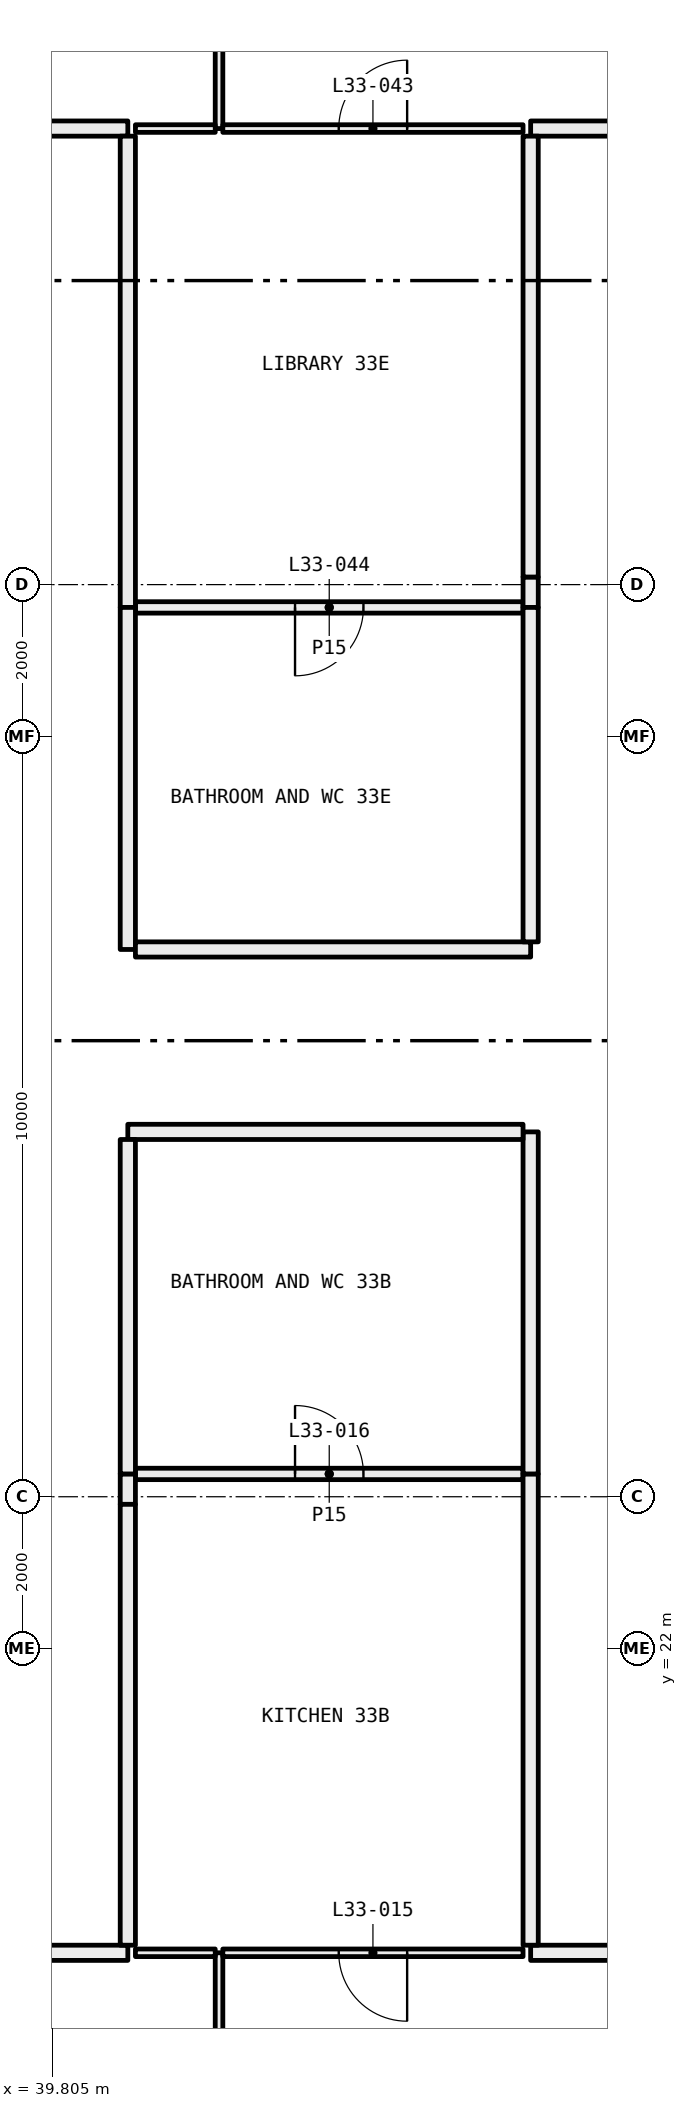
"""IFC4 building model, lengths in metres.
Left out: names, types, materials, properties, quantities, classifications, styles, units other than length and angle.
Written with IfcOpenShell. Run it as: python <this file> out.ifc"""

import sys

from ifc_helpers import new_model, si_unit, direction, frame, frame_2d, origin, place, context, subcontext, project, spatial, rectangle, extrude, element, fill, save


model = new_model("IFC4")
c1 = context("Model", 3, precision=1e-05, world=origin(), true_north=direction((0.0, 1.0)))
c2 = subcontext(c1, "Body", "Model", "MODEL_VIEW")
j1 = project(units=[si_unit("LENGTHUNIT", "METRE"), si_unit("PLANEANGLEUNIT", "RADIAN")], contexts=[c1])
p1 = place(None, origin())
s1 = spatial("IfcSite", under=j1, at=p1, CompositionType="ELEMENT")
p2 = place(p1, origin())
s2 = spatial("IfcBuilding", under=s1, at=p2, CompositionType="ELEMENT")
p3 = place(p2, frame((0.0, 0.0, 127.65)))
s3 = spatial("IfcBuildingStorey", under=s2, at=p3, CompositionType="ELEMENT", Elevation=127.65)
p4 = place(p3, frame((42.0, 12.72, 0.0), z_axis=(0.0, 0.0, 1.0), x_axis=(0.0, 1.0, 0.0)))
e1 = element("IfcWall", 1, at=p4, inside=s3, PredefinedType="PARTITIONING", context=c2, shape_type="SweptSolid", body=[
    extrude(rectangle(XDim=5.28, YDim=0.1, at=frame_2d((2.64, 0.0))), origin(), (0.0, 0.0, 1.0), 3.05),
])
p5 = place(p4, frame((2.19, 0.0, 0.0)))
e2 = element("IfcOpeningElement", 2, at=p5, cuts=e1, PredefinedType="OPENING", context=c2, shape_type="SweptSolid", body=[
    extrude(rectangle(XDim=0.9, YDim=2.1, at=frame_2d((0.45, 1.05))), frame((0.0, 0.06, 0.0), z_axis=(0.0, -1.0, 0.0), x_axis=(1.0, 0.0, 0.0)), (0.0, 0.0, 1.0), 0.12),
])
p6 = place(p3, frame((41.95, 18.0, 0.0), z_axis=(0.0, 0.0, 1.0), x_axis=(-1.0, 0.0, 0.0)))
e3 = element("IfcWall", 3, at=p6, inside=s3, PredefinedType="PARTITIONING", context=c2, shape_type="SweptSolid", body=[
    extrude(rectangle(XDim=1.05, YDim=0.1, at=frame_2d((0.525, 0.0))), origin(), (0.0, 0.0, 1.0), 3.05),
])
p7 = place(p3, frame((40.8, 18.0, 0.0), z_axis=(0.0, 0.0, 1.0), x_axis=(-1.0, 0.0, 0.0)))
e4 = element("IfcWall", 4, at=p7, inside=s3, PredefinedType="PARTITIONING", context=c2, shape_type="SweptSolid", body=[
    extrude(rectangle(XDim=2.3, YDim=0.2, at=frame_2d((1.15, 0.0))), origin(), (0.0, 0.0, 1.0), 3.05),
])
p8 = place(p3, frame((46.0, 18.0, 0.0), z_axis=(0.0, 0.0, 1.0), x_axis=(-1.0, 0.0, 0.0)))
e5 = element("IfcWall", 5, at=p8, inside=s3, PredefinedType="PARTITIONING", context=c2, shape_type="SweptSolid", body=[
    extrude(rectangle(XDim=3.95, YDim=0.1, at=frame_2d((1.975, 0.0))), origin(), (0.0, 0.0, 1.0), 3.05),
])
p9 = place(p8, frame((1.525, 0.0, 0.0)))
e6 = element("IfcOpeningElement", 6, at=p9, cuts=e5, PredefinedType="OPENING", context=c2, shape_type="SweptSolid", body=[
    extrude(rectangle(XDim=0.9, YDim=2.1, at=frame_2d((0.45, 1.05))), frame((0.0, 0.06, 0.0), z_axis=(0.0, -1.0, 0.0), x_axis=(1.0, 0.0, 0.0)), (0.0, 0.0, 1.0), 0.12),
])
p10 = place(p3, frame((48.0, 18.0, 0.0), z_axis=(0.0, 0.0, 1.0), x_axis=(-1.0, 0.0, 0.0)))
e7 = element("IfcWall", 7, at=p10, inside=s3, PredefinedType="PARTITIONING", context=c2, shape_type="SweptSolid", body=[
    extrude(rectangle(XDim=1.9, YDim=0.2, at=frame_2d((0.95, 0.0))), origin(), (0.0, 0.0, 1.0), 3.05),
])
p11 = place(p3, frame((46.0, 24.3, 0.0), z_axis=(0.0, 0.0, 1.0), x_axis=(-1.0, 0.0, 0.0)))
e8 = element("IfcWall", 8, at=p11, inside=s3, PredefinedType="PARTITIONING", context=c2, shape_type="SweptSolid", body=[
    extrude(rectangle(XDim=5.1, YDim=0.15, at=frame_2d((2.55, 0.0))), origin(), (0.0, 0.0, 1.0), 3.05),
])
p12 = place(p11, frame((2.1, 0.0, 0.0)))
e9 = element("IfcOpeningElement", 9, at=p12, cuts=e8, PredefinedType="OPENING", context=c2, shape_type="SweptSolid", body=[
    extrude(rectangle(XDim=0.9, YDim=2.1, at=frame_2d((0.45, 1.05))), frame((0.0, 0.085, 0.0), z_axis=(0.0, -1.0, 0.0), x_axis=(1.0, 0.0, 0.0)), (0.0, 0.0, 1.0), 0.17),
])
p13 = place(p3, frame((40.8, 24.3, 0.0), z_axis=(0.0, 0.0, 1.0), x_axis=(0.0, -1.0, 0.0)))
e10 = element("IfcWall", 10, at=p13, inside=s3, PredefinedType="PARTITIONING", context=c2, shape_type="SweptSolid", body=[
    extrude(rectangle(XDim=0.4, YDim=0.2, at=frame_2d((0.2, 0.0))), origin(), (0.0, 0.0, 1.0), 2.45),
])
p14 = place(p3, frame((40.8, 23.9, 0.0), z_axis=(0.0, 0.0, 1.0), x_axis=(0.0, -1.0, 0.0)))
e11 = element("IfcWall", 11, at=p14, inside=s3, PredefinedType="PARTITIONING", context=c2, shape_type="SweptSolid", body=[
    extrude(rectangle(XDim=5.8, YDim=0.2, at=frame_2d((2.9, 0.0))), origin(), (0.0, 0.0, 1.0), 3.05),
])
p15 = place(p3, frame((46.1, 18.1, 0.0), z_axis=(0.0, 0.0, 1.0), x_axis=(0.0, 1.0, 0.0)))
e12 = element("IfcWall", 12, at=p15, inside=s3, PredefinedType="PARTITIONING", context=c2, shape_type="SweptSolid", body=[
    extrude(rectangle(XDim=6.2, YDim=0.2, at=frame_2d((3.1, 0.0))), origin(), (0.0, 0.0, 1.0), 2.45),
])
p16 = place(p3, frame((46.1, 24.3, 0.0), z_axis=(0.0, 0.0, 1.0), x_axis=(0.0, 1.0, 0.0)))
e13 = element("IfcWall", 13, at=p16, inside=s3, PredefinedType="PARTITIONING", context=c2, shape_type="SweptSolid", body=[
    extrude(rectangle(XDim=4.5, YDim=0.2, at=frame_2d((2.25, 0.0))), origin(), (0.0, 0.0, 1.0), 3.05),
])
p17 = place(p3, frame((46.0, 28.8, 0.0), z_axis=(0.0, 0.0, 1.0), x_axis=(-1.0, 0.0, 0.0)))
e14 = element("IfcWall", 14, at=p17, inside=s3, PredefinedType="PARTITIONING", context=c2, shape_type="SweptSolid", body=[
    extrude(rectangle(XDim=5.2, YDim=0.2, at=frame_2d((2.6, 0.0))), origin(), (0.0, 0.0, 1.0), 3.05),
])
p18 = place(p3, frame((40.8, 28.7, 0.0), z_axis=(0.0, 0.0, 1.0), x_axis=(0.0, -1.0, 0.0)))
e15 = element("IfcWall", 15, at=p18, inside=s3, PredefinedType="PARTITIONING", context=c2, shape_type="SweptSolid", body=[
    extrude(rectangle(XDim=4.4, YDim=0.2, at=frame_2d((2.2, 0.0))), origin(), (0.0, 0.0, 1.0), 3.05),
])
p19 = place(p3, frame((42.0, 42.0, 0.0), z_axis=(0.0, 0.0, 1.0), x_axis=(0.0, 1.0, 0.0)))
e16 = element("IfcWall", 16, at=p19, inside=s3, PredefinedType="PARTITIONING", context=c2, shape_type="SweptSolid", body=[
    extrude(rectangle(XDim=5.28, YDim=0.1, at=frame_2d((2.64, 0.0))), origin(), (0.0, 0.0, 1.0), 3.05),
])
p20 = place(p19, frame((2.19, 0.0, 0.0)))
e17 = element("IfcOpeningElement", 17, at=p20, cuts=e16, PredefinedType="OPENING", context=c2, shape_type="SweptSolid", body=[
    extrude(rectangle(XDim=0.9, YDim=2.1, at=frame_2d((0.45, 1.05))), frame((0.0, 0.06, 0.0), z_axis=(0.0, -1.0, 0.0), x_axis=(1.0, 0.0, 0.0)), (0.0, 0.0, 1.0), 0.12),
])
p21 = place(p3, frame((40.9, 42.0, 0.0), z_axis=(0.0, 0.0, 1.0), x_axis=(1.0, 0.0, 0.0)))
e18 = element("IfcWall", 18, at=p21, inside=s3, PredefinedType="PARTITIONING", context=c2, shape_type="SweptSolid", body=[
    extrude(rectangle(XDim=1.05, YDim=0.1, at=frame_2d((0.525, 0.0))), origin(), (0.0, 0.0, 1.0), 3.05),
])
p22 = place(p3, frame((38.5, 42.0, 0.0), z_axis=(0.0, 0.0, 1.0), x_axis=(1.0, 0.0, 0.0)))
e19 = element("IfcWall", 19, at=p22, inside=s3, PredefinedType="PARTITIONING", context=c2, shape_type="SweptSolid", body=[
    extrude(rectangle(XDim=2.3, YDim=0.2, at=frame_2d((1.15, 0.0))), origin(), (0.0, 0.0, 1.0), 3.05),
])
p23 = place(p3, frame((42.05, 42.0, 0.0), z_axis=(0.0, 0.0, 1.0), x_axis=(1.0, 0.0, 0.0)))
e20 = element("IfcWall", 20, at=p23, inside=s3, PredefinedType="PARTITIONING", context=c2, shape_type="SweptSolid", body=[
    extrude(rectangle(XDim=3.95, YDim=0.1, at=frame_2d((1.975, 0.0))), origin(), (0.0, 0.0, 1.0), 3.05),
])
p24 = place(p23, frame((1.525, 0.0, 0.0)))
e21 = element("IfcOpeningElement", 21, at=p24, cuts=e20, PredefinedType="OPENING", context=c2, shape_type="SweptSolid", body=[
    extrude(rectangle(XDim=0.9, YDim=2.1, at=frame_2d((0.45, 1.05))), frame((0.0, 0.06, 0.0), z_axis=(0.0, -1.0, 0.0), x_axis=(1.0, 0.0, 0.0)), (0.0, 0.0, 1.0), 0.12),
])
p25 = place(p3, frame((46.1, 42.0, 0.0), z_axis=(0.0, 0.0, 1.0), x_axis=(1.0, 0.0, 0.0)))
e22 = element("IfcWall", 22, at=p25, inside=s3, PredefinedType="PARTITIONING", context=c2, shape_type="SweptSolid", body=[
    extrude(rectangle(XDim=1.9, YDim=0.2, at=frame_2d((0.95, 0.0))), origin(), (0.0, 0.0, 1.0), 3.05),
])
p26 = place(p3, frame((40.9, 35.7, 0.0), z_axis=(0.0, 0.0, 1.0), x_axis=(1.0, 0.0, 0.0)))
e23 = element("IfcWall", 23, at=p26, inside=s3, PredefinedType="PARTITIONING", context=c2, shape_type="SweptSolid", body=[
    extrude(rectangle(XDim=5.1, YDim=0.15, at=frame_2d((2.55, 0.0))), origin(), (0.0, 0.0, 1.0), 3.05),
])
p27 = place(p26, frame((2.1, 0.0, 0.0)))
e24 = element("IfcOpeningElement", 24, at=p27, cuts=e23, PredefinedType="OPENING", context=c2, shape_type="SweptSolid", body=[
    extrude(rectangle(XDim=0.9, YDim=2.1, at=frame_2d((0.45, 1.05))), frame((0.0, 0.085, 0.0), z_axis=(0.0, -1.0, 0.0), x_axis=(1.0, 0.0, 0.0)), (0.0, 0.0, 1.0), 0.17),
])
p28 = place(p3, frame((40.8, 41.9, 0.0), z_axis=(0.0, 0.0, 1.0), x_axis=(0.0, -1.0, 0.0)))
e25 = element("IfcWall", 25, at=p28, inside=s3, PredefinedType="PARTITIONING", context=c2, shape_type="SweptSolid", body=[
    extrude(rectangle(XDim=6.2, YDim=0.2, at=frame_2d((3.1, 0.0))), origin(), (0.0, 0.0, 1.0), 2.45),
])
p29 = place(p3, frame((46.1, 35.7, 0.0), z_axis=(0.0, 0.0, 1.0), x_axis=(0.0, 1.0, 0.0)))
e26 = element("IfcWall", 26, at=p29, inside=s3, PredefinedType="PARTITIONING", context=c2, shape_type="SweptSolid", body=[
    extrude(rectangle(XDim=0.4, YDim=0.2, at=frame_2d((0.2, 0.0))), origin(), (0.0, 0.0, 1.0), 2.45),
])
p30 = place(p3, frame((46.1, 36.1, 0.0), z_axis=(0.0, 0.0, 1.0), x_axis=(0.0, 1.0, 0.0)))
e27 = element("IfcWall", 27, at=p30, inside=s3, PredefinedType="PARTITIONING", context=c2, shape_type="SweptSolid", body=[
    extrude(rectangle(XDim=5.8, YDim=0.2, at=frame_2d((2.9, 0.0))), origin(), (0.0, 0.0, 1.0), 3.05),
])
p31 = place(p3, frame((40.8, 35.7, 0.0), z_axis=(0.0, 0.0, 1.0), x_axis=(0.0, -1.0, 0.0)))
e28 = element("IfcWall", 28, at=p31, inside=s3, PredefinedType="PARTITIONING", context=c2, shape_type="SweptSolid", body=[
    extrude(rectangle(XDim=4.5, YDim=0.2, at=frame_2d((2.25, 0.0))), origin(), (0.0, 0.0, 1.0), 3.05),
])
p32 = place(p3, frame((40.9, 31.2, 0.0), z_axis=(0.0, 0.0, 1.0), x_axis=(1.0, 0.0, 0.0)))
e29 = element("IfcWall", 29, at=p32, inside=s3, PredefinedType="PARTITIONING", context=c2, shape_type="SweptSolid", body=[
    extrude(rectangle(XDim=5.2, YDim=0.2, at=frame_2d((2.6, 0.0))), origin(), (0.0, 0.0, 1.0), 3.05),
])
p33 = place(p3, frame((46.1, 31.3, 0.0), z_axis=(0.0, 0.0, 1.0), x_axis=(0.0, 1.0, 0.0)))
e30 = element("IfcWall", 30, at=p33, inside=s3, PredefinedType="PARTITIONING", context=c2, shape_type="SweptSolid", body=[
    extrude(rectangle(XDim=4.4, YDim=0.2, at=frame_2d((2.2, 0.0))), origin(), (0.0, 0.0, 1.0), 3.05),
])
p34 = place(p9, origin())
e31 = element("IfcDoor", 31, at=p34, inside=s3, OperationType="SINGLE_SWING_RIGHT", PredefinedType="DOOR", context=c2, shape_type="SweptSolid", body=[
    extrude(rectangle(XDim=0.9, YDim=2.1, at=frame_2d((0.45, 1.05))), frame((0.0, 0.025, 0.0), z_axis=(0.0, -1.0, 0.0), x_axis=(1.0, 0.0, 0.0)), (0.0, 0.0, 1.0), 0.05),
])
fill(e6, e31)
p35 = place(p12, frame((0.9, 0.0, 0.0), x_axis=(-1.0, 0.0, 0.0)))
e32 = element("IfcDoor", 32, at=p35, inside=s3, OperationType="SINGLE_SWING_RIGHT", PredefinedType="DOOR", context=c2, shape_type="SweptSolid", body=[
    extrude(rectangle(XDim=0.9, YDim=2.1, at=frame_2d((0.45, 1.05))), frame((0.0, 0.025, 0.0), z_axis=(0.0, -1.0, 0.0), x_axis=(1.0, 0.0, 0.0)), (0.0, 0.0, 1.0), 0.05),
])
fill(e9, e32)
p36 = place(p24, origin())
e33 = element("IfcDoor", 33, at=p36, inside=s3, OperationType="SINGLE_SWING_LEFT", PredefinedType="DOOR", context=c2, shape_type="SweptSolid", body=[
    extrude(rectangle(XDim=0.9, YDim=2.1, at=frame_2d((0.45, 1.05))), frame((0.0, 0.025, 0.0), z_axis=(0.0, -1.0, 0.0), x_axis=(1.0, 0.0, 0.0)), (0.0, 0.0, 1.0), 0.05),
])
fill(e21, e33)
p37 = place(p27, frame((0.9, 0.0, 0.0), x_axis=(-1.0, 0.0, 0.0)))
e34 = element("IfcDoor", 34, at=p37, inside=s3, OperationType="SINGLE_SWING_LEFT", PredefinedType="DOOR", context=c2, shape_type="SweptSolid", body=[
    extrude(rectangle(XDim=0.9, YDim=2.1, at=frame_2d((0.45, 1.05))), frame((0.0, 0.025, 0.0), z_axis=(0.0, -1.0, 0.0), x_axis=(1.0, 0.0, 0.0)), (0.0, 0.0, 1.0), 0.05),
])
fill(e24, e34)
save(model, sys.argv[1])
